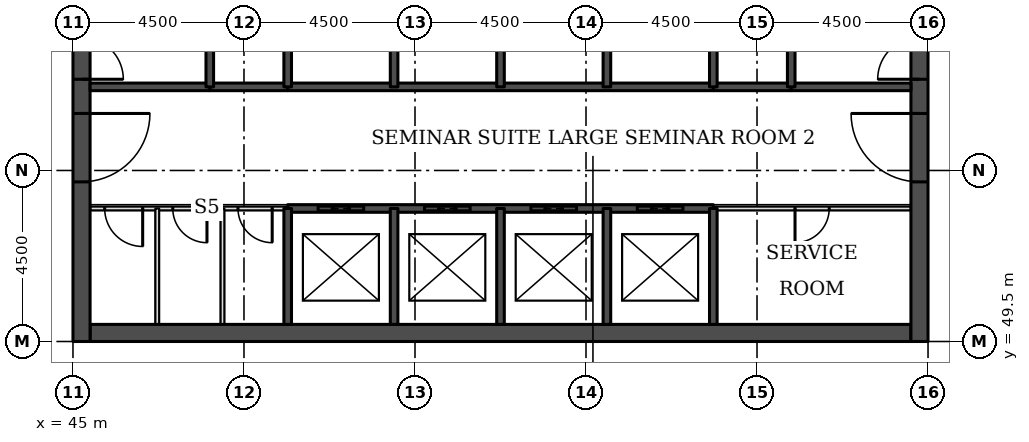
"""IFC4 building model, lengths in metres.
Left out: names, types, materials, properties, quantities, classifications, styles, units other than length and angle.
Written with IfcOpenShell. Run it as: python <this file> out.ifc"""

import sys

from ifc_helpers import new_model, si_unit, direction, frame, frame_2d, origin, place, context, subcontext, project, spatial, rectangle, extrude, element, fill, save


model = new_model("IFC4")
c1 = context("Model", 3, precision=1e-05, world=origin(), true_north=direction((0.0, 1.0)))
c2 = subcontext(c1, "Body", "Model", "MODEL_VIEW")
j1 = project(units=[si_unit("LENGTHUNIT", "METRE"), si_unit("PLANEANGLEUNIT", "RADIAN")], contexts=[c1])
p1 = place(None, origin())
s1 = spatial("IfcSite", under=j1, at=p1, CompositionType="ELEMENT")
p2 = place(p1, origin())
s2 = spatial("IfcBuilding", under=s1, at=p2, CompositionType="ELEMENT")
p3 = place(p2, frame((0.0, 0.0, 101.1)))
s3 = spatial("IfcBuildingStorey", under=s2, at=p3, CompositionType="ELEMENT", Elevation=101.1)
p4 = place(p3, frame((45.45, 49.725, 0.0), z_axis=(0.0, 0.0, 1.0), x_axis=(1.0, 0.0, 0.0)))
e1 = element("IfcWall", 1, at=p4, inside=s3, PredefinedType="SHEAR", context=c2, shape_type="SweptSolid", body=[
    extrude(rectangle(XDim=21.6, YDim=0.45, at=frame_2d((10.8, 0.0))), origin(), (0.0, 0.0, 1.0), 3.7),
])
p5 = place(p3, frame((45.225, 49.5, 0.0), z_axis=(0.0, 0.0, 1.0), x_axis=(0.0, 1.0, 0.0)))
e2 = element("IfcWall", 2, at=p5, inside=s3, PredefinedType="SHEAR", context=c2, shape_type="SweptSolid", body=[
    extrude(rectangle(XDim=22.5, YDim=0.45, at=frame_2d((11.25, 0.0))), origin(), (0.0, 0.0, 1.0), 3.7),
])
p6 = place(p5, frame((4.2, 0.0, 0.0)))
e3 = element("IfcOpeningElement", 3, at=p6, cuts=e2, PredefinedType="OPENING", context=c2, shape_type="SweptSolid", body=[
    extrude(rectangle(XDim=1.8, YDim=2.1, at=frame_2d((0.9, 1.05))), frame((0.0, 0.235, 0.0), z_axis=(0.0, -1.0, 0.0), x_axis=(1.0, 0.0, 0.0)), (0.0, 0.0, 1.0), 0.47),
])
p7 = place(p5, frame((6.9, 0.0, 0.0)))
e4 = element("IfcOpeningElement", 4, at=p7, cuts=e2, PredefinedType="OPENING", context=c2, shape_type="SweptSolid", body=[
    extrude(rectangle(XDim=1.1, YDim=2.1, at=frame_2d((0.55, 1.05))), frame((0.0, 0.235, 0.0), z_axis=(0.0, -1.0, 0.0), x_axis=(1.0, 0.0, 0.0)), (0.0, 0.0, 1.0), 0.47),
])
p8 = place(p5, frame((13.6, 0.0, 0.0)))
e5 = element("IfcOpeningElement", 5, at=p8, cuts=e2, PredefinedType="OPENING", context=c2, shape_type="SweptSolid", body=[
    extrude(rectangle(XDim=1.1, YDim=2.1, at=frame_2d((0.55, 1.05))), frame((0.0, 0.235, 0.0), z_axis=(0.0, -1.0, 0.0), x_axis=(1.0, 0.0, 0.0)), (0.0, 0.0, 1.0), 0.47),
])
p9 = place(p5, frame((16.5, 0.0, 0.0)))
e6 = element("IfcOpeningElement", 6, at=p9, cuts=e2, PredefinedType="OPENING", context=c2, shape_type="SweptSolid", body=[
    extrude(rectangle(XDim=1.8, YDim=2.1, at=frame_2d((0.9, 1.05))), frame((0.0, 0.235, 0.0), z_axis=(0.0, -1.0, 0.0), x_axis=(1.0, 0.0, 0.0)), (0.0, 0.0, 1.0), 0.47),
])
p10 = place(p3, frame((67.275, 49.5, 0.0), z_axis=(0.0, 0.0, 1.0), x_axis=(0.0, 1.0, 0.0)))
e7 = element("IfcWall", 7, at=p10, inside=s3, PredefinedType="SHEAR", context=c2, shape_type="SweptSolid", body=[
    extrude(rectangle(XDim=22.5, YDim=0.45, at=frame_2d((11.25, 0.0))), origin(), (0.0, 0.0, 1.0), 3.7),
])
p11 = place(p10, frame((4.2, 0.0, 0.0)))
e8 = element("IfcOpeningElement", 8, at=p11, cuts=e7, PredefinedType="OPENING", context=c2, shape_type="SweptSolid", body=[
    extrude(rectangle(XDim=1.8, YDim=2.1, at=frame_2d((0.9, 1.05))), frame((0.0, 0.235, 0.0), z_axis=(0.0, -1.0, 0.0), x_axis=(1.0, 0.0, 0.0)), (0.0, 0.0, 1.0), 0.47),
])
p12 = place(p10, frame((6.9, 0.0, 0.0)))
e9 = element("IfcOpeningElement", 9, at=p12, cuts=e7, PredefinedType="OPENING", context=c2, shape_type="SweptSolid", body=[
    extrude(rectangle(XDim=1.1, YDim=2.1, at=frame_2d((0.55, 1.05))), frame((0.0, 0.235, 0.0), z_axis=(0.0, -1.0, 0.0), x_axis=(1.0, 0.0, 0.0)), (0.0, 0.0, 1.0), 0.47),
])
p13 = place(p10, frame((13.6, 0.0, 0.0)))
e10 = element("IfcOpeningElement", 10, at=p13, cuts=e7, PredefinedType="OPENING", context=c2, shape_type="SweptSolid", body=[
    extrude(rectangle(XDim=1.1, YDim=2.1, at=frame_2d((0.55, 1.05))), frame((0.0, 0.235, 0.0), z_axis=(0.0, -1.0, 0.0), x_axis=(1.0, 0.0, 0.0)), (0.0, 0.0, 1.0), 0.47),
])
p14 = place(p10, frame((16.5, 0.0, 0.0)))
e11 = element("IfcOpeningElement", 11, at=p14, cuts=e7, PredefinedType="OPENING", context=c2, shape_type="SweptSolid", body=[
    extrude(rectangle(XDim=1.8, YDim=2.1, at=frame_2d((0.9, 1.05))), frame((0.0, 0.235, 0.0), z_axis=(0.0, -1.0, 0.0), x_axis=(1.0, 0.0, 0.0)), (0.0, 0.0, 1.0), 0.47),
])
p15 = place(p3, frame((45.45, 53.0, 0.0), z_axis=(0.0, 0.0, 1.0), x_axis=(1.0, 0.0, 0.0)))
e12 = element("IfcWall", 12, at=p15, inside=s3, PredefinedType="PARTITIONING", context=c2, shape_type="SweptSolid", body=[
    extrude(rectangle(XDim=5.2, YDim=0.1, at=frame_2d((2.6, 0.0))), origin(), (0.0, 0.0, 1.0), 3.55),
])
p16 = place(p15, frame((0.384, 0.0, 0.0)))
e13 = element("IfcOpeningElement", 13, at=p16, cuts=e12, PredefinedType="OPENING", context=c2, shape_type="SweptSolid", body=[
    extrude(rectangle(XDim=1.0, YDim=2.1, at=frame_2d((0.5, 1.05))), frame((0.0, 0.06, 0.0), z_axis=(0.0, -1.0, 0.0), x_axis=(1.0, 0.0, 0.0)), (0.0, 0.0, 1.0), 0.12),
])
p17 = place(p15, frame((2.176, 0.0, 0.0)))
e14 = element("IfcOpeningElement", 14, at=p17, cuts=e12, PredefinedType="OPENING", context=c2, shape_type="SweptSolid", body=[
    extrude(rectangle(XDim=0.9, YDim=2.1, at=frame_2d((0.45, 1.05))), frame((0.0, 0.06, 0.0), z_axis=(0.0, -1.0, 0.0), x_axis=(1.0, 0.0, 0.0)), (0.0, 0.0, 1.0), 0.12),
])
p18 = place(p15, frame((3.892, 0.0, 0.0)))
e15 = element("IfcOpeningElement", 15, at=p18, cuts=e12, PredefinedType="OPENING", context=c2, shape_type="SweptSolid", body=[
    extrude(rectangle(XDim=0.9, YDim=2.1, at=frame_2d((0.45, 1.05))), frame((0.0, 0.06, 0.0), z_axis=(0.0, -1.0, 0.0), x_axis=(1.0, 0.0, 0.0)), (0.0, 0.0, 1.0), 0.12),
])
p19 = place(p3, frame((61.85, 53.0, 0.0), z_axis=(0.0, 0.0, 1.0), x_axis=(1.0, 0.0, 0.0)))
e16 = element("IfcWall", 16, at=p19, inside=s3, PredefinedType="PARTITIONING", context=c2, shape_type="SweptSolid", body=[
    extrude(rectangle(XDim=5.2, YDim=0.1, at=frame_2d((2.6, 0.0))), origin(), (0.0, 0.0, 1.0), 3.55),
])
p20 = place(p19, frame((2.15, 0.0, 0.0)))
e17 = element("IfcOpeningElement", 17, at=p20, cuts=e16, PredefinedType="OPENING", context=c2, shape_type="SweptSolid", body=[
    extrude(rectangle(XDim=0.9, YDim=2.1, at=frame_2d((0.45, 1.05))), frame((0.0, 0.06, 0.0), z_axis=(0.0, -1.0, 0.0), x_axis=(1.0, 0.0, 0.0)), (0.0, 0.0, 1.0), 0.12),
])
p21 = place(p3, frame((50.65, 53.0, 0.0), z_axis=(0.0, 0.0, 1.0), x_axis=(1.0, 0.0, 0.0)))
e18 = element("IfcWall", 18, at=p21, inside=s3, PredefinedType="SOLIDWALL", context=c2, shape_type="SweptSolid", body=[
    extrude(rectangle(XDim=11.2, YDim=0.2, at=frame_2d((5.6, 0.0))), origin(), (0.0, 0.0, 1.0), 3.55),
])
p22 = place(p21, frame((0.8, 0.0, 0.0)))
e19 = element("IfcOpeningElement", 19, at=p22, cuts=e18, PredefinedType="OPENING", context=c2, shape_type="SweptSolid", body=[
    extrude(rectangle(XDim=1.2, YDim=2.1, at=frame_2d((0.6, 1.05))), frame((0.0, 0.11, 0.0), z_axis=(0.0, -1.0, 0.0), x_axis=(1.0, 0.0, 0.0)), (0.0, 0.0, 1.0), 0.22),
])
p23 = place(p21, frame((3.6, 0.0, 0.0)))
e20 = element("IfcOpeningElement", 20, at=p23, cuts=e18, PredefinedType="OPENING", context=c2, shape_type="SweptSolid", body=[
    extrude(rectangle(XDim=1.2, YDim=2.1, at=frame_2d((0.6, 1.05))), frame((0.0, 0.11, 0.0), z_axis=(0.0, -1.0, 0.0), x_axis=(1.0, 0.0, 0.0)), (0.0, 0.0, 1.0), 0.22),
])
p24 = place(p21, frame((6.4, 0.0, 0.0)))
e21 = element("IfcOpeningElement", 21, at=p24, cuts=e18, PredefinedType="OPENING", context=c2, shape_type="SweptSolid", body=[
    extrude(rectangle(XDim=1.2, YDim=2.1, at=frame_2d((0.6, 1.05))), frame((0.0, 0.11, 0.0), z_axis=(0.0, -1.0, 0.0), x_axis=(1.0, 0.0, 0.0)), (0.0, 0.0, 1.0), 0.22),
])
p25 = place(p21, frame((9.2, 0.0, 0.0)))
e22 = element("IfcOpeningElement", 22, at=p25, cuts=e18, PredefinedType="OPENING", context=c2, shape_type="SweptSolid", body=[
    extrude(rectangle(XDim=1.2, YDim=2.1, at=frame_2d((0.6, 1.05))), frame((0.0, 0.11, 0.0), z_axis=(0.0, -1.0, 0.0), x_axis=(1.0, 0.0, 0.0)), (0.0, 0.0, 1.0), 0.22),
])
for number, where, z_axis, x_axis in (
    (23, (48.6, 56.2, 0.0), (0.0, 0.0, 1.0), (1.0, 0.0, 0.0)),
    (24, (61.85, 56.2, 0.0), (0.0, 0.0, 1.0), (1.0, 0.0, 0.0)),
):
    element("IfcWall", number, at=place(p3, frame(where, z_axis=z_axis, x_axis=x_axis)), inside=s3, PredefinedType="SOLIDWALL", context=c2, shape_type="SweptSolid", body=[
        extrude(rectangle(XDim=2.05, YDim=0.2, at=frame_2d((1.025, 0.0))), origin(), (0.0, 0.0, 1.0), 3.55),
    ])
p26 = place(p3, frame((45.45, 56.2, 0.0), z_axis=(0.0, 0.0, 1.0), x_axis=(1.0, 0.0, 0.0)))
e25 = element("IfcWall", 25, at=p26, inside=s3, PredefinedType="SOLIDWALL", context=c2, shape_type="SweptSolid", body=[
    extrude(rectangle(XDim=3.15, YDim=0.2, at=frame_2d((1.575, 0.0))), origin(), (0.0, 0.0, 1.0), 3.55),
])
p27 = place(p3, frame((50.65, 56.2, 0.0), z_axis=(0.0, 0.0, 1.0), x_axis=(1.0, 0.0, 0.0)))
e26 = element("IfcWall", 26, at=p27, inside=s3, PredefinedType="SOLIDWALL", context=c2, shape_type="SweptSolid", body=[
    extrude(rectangle(XDim=11.2, YDim=0.2, at=frame_2d((5.6, 0.0))), origin(), (0.0, 0.0, 1.0), 3.55),
])
p28 = place(p3, frame((63.9, 56.2, 0.0), z_axis=(0.0, 0.0, 1.0), x_axis=(1.0, 0.0, 0.0)))
e27 = element("IfcWall", 27, at=p28, inside=s3, PredefinedType="SOLIDWALL", context=c2, shape_type="SweptSolid", body=[
    extrude(rectangle(XDim=3.15, YDim=0.2, at=frame_2d((1.575, 0.0))), origin(), (0.0, 0.0, 1.0), 3.55),
])
p29 = place(p3, frame((47.218, 49.95, 0.0), z_axis=(0.0, 0.0, 1.0), x_axis=(0.0, 1.0, 0.0)))
e28 = element("IfcWall", 28, at=p29, inside=s3, PredefinedType="PARTITIONING", context=c2, shape_type="SweptSolid", body=[
    extrude(rectangle(XDim=3.05, YDim=0.1, at=frame_2d((1.525, 0.0))), origin(), (0.0, 0.0, 1.0), 3.55),
])
p30 = place(p3, frame((48.6, 56.2, 0.0), z_axis=(0.0, 0.0, 1.0), x_axis=(0.0, 1.0, 0.0)))
e29 = element("IfcWall", 29, at=p30, inside=s3, PredefinedType="SOLIDWALL", context=c2, shape_type="SweptSolid", body=[
    extrude(rectangle(XDim=5.8, YDim=0.2, at=frame_2d((2.9, 0.0))), origin(), (0.0, 0.0, 1.0), 3.55),
])
p31 = place(p3, frame((48.934, 49.95, 0.0), z_axis=(0.0, 0.0, 1.0), x_axis=(0.0, 1.0, 0.0)))
e30 = element("IfcWall", 30, at=p31, inside=s3, PredefinedType="PARTITIONING", context=c2, shape_type="SweptSolid", body=[
    extrude(rectangle(XDim=3.05, YDim=0.1, at=frame_2d((1.525, 0.0))), origin(), (0.0, 0.0, 1.0), 3.55),
])
p32 = place(p3, frame((50.65, 49.95, 0.0), z_axis=(0.0, 0.0, 1.0), x_axis=(0.0, 1.0, 0.0)))
e31 = element("IfcWall", 31, at=p32, inside=s3, PredefinedType="SOLIDWALL", context=c2, shape_type="SweptSolid", body=[
    extrude(rectangle(XDim=3.05, YDim=0.2, at=frame_2d((1.525, 0.0))), origin(), (0.0, 0.0, 1.0), 3.55),
])
p33 = place(p3, frame((50.65, 56.2, 0.0), z_axis=(0.0, 0.0, 1.0), x_axis=(0.0, 1.0, 0.0)))
e32 = element("IfcWall", 32, at=p33, inside=s3, PredefinedType="SOLIDWALL", context=c2, shape_type="SweptSolid", body=[
    extrude(rectangle(XDim=2.8, YDim=0.2, at=frame_2d((1.4, 0.0))), origin(), (0.0, 0.0, 1.0), 3.55),
])
p34 = place(p3, frame((53.45, 49.95, 0.0), z_axis=(0.0, 0.0, 1.0), x_axis=(0.0, 1.0, 0.0)))
e33 = element("IfcWall", 33, at=p34, inside=s3, PredefinedType="SOLIDWALL", context=c2, shape_type="SweptSolid", body=[
    extrude(rectangle(XDim=3.05, YDim=0.2, at=frame_2d((1.525, 0.0))), origin(), (0.0, 0.0, 1.0), 3.55),
])
p35 = place(p3, frame((53.45, 56.2, 0.0), z_axis=(0.0, 0.0, 1.0), x_axis=(0.0, 1.0, 0.0)))
e34 = element("IfcWall", 34, at=p35, inside=s3, PredefinedType="SOLIDWALL", context=c2, shape_type="SweptSolid", body=[
    extrude(rectangle(XDim=2.8, YDim=0.2, at=frame_2d((1.4, 0.0))), origin(), (0.0, 0.0, 1.0), 3.55),
])
p36 = place(p3, frame((56.25, 49.95, 0.0), z_axis=(0.0, 0.0, 1.0), x_axis=(0.0, 1.0, 0.0)))
e35 = element("IfcWall", 35, at=p36, inside=s3, PredefinedType="SOLIDWALL", context=c2, shape_type="SweptSolid", body=[
    extrude(rectangle(XDim=3.05, YDim=0.2, at=frame_2d((1.525, 0.0))), origin(), (0.0, 0.0, 1.0), 3.55),
])
p37 = place(p3, frame((56.25, 56.2, 0.0), z_axis=(0.0, 0.0, 1.0), x_axis=(0.0, 1.0, 0.0)))
e36 = element("IfcWall", 36, at=p37, inside=s3, PredefinedType="SOLIDWALL", context=c2, shape_type="SweptSolid", body=[
    extrude(rectangle(XDim=2.8, YDim=0.2, at=frame_2d((1.4, 0.0))), origin(), (0.0, 0.0, 1.0), 3.55),
])
p38 = place(p3, frame((59.05, 49.95, 0.0), z_axis=(0.0, 0.0, 1.0), x_axis=(0.0, 1.0, 0.0)))
e37 = element("IfcWall", 37, at=p38, inside=s3, PredefinedType="SOLIDWALL", context=c2, shape_type="SweptSolid", body=[
    extrude(rectangle(XDim=3.05, YDim=0.2, at=frame_2d((1.525, 0.0))), origin(), (0.0, 0.0, 1.0), 3.55),
])
p39 = place(p3, frame((59.05, 56.2, 0.0), z_axis=(0.0, 0.0, 1.0), x_axis=(0.0, 1.0, 0.0)))
e38 = element("IfcWall", 38, at=p39, inside=s3, PredefinedType="SOLIDWALL", context=c2, shape_type="SweptSolid", body=[
    extrude(rectangle(XDim=2.8, YDim=0.2, at=frame_2d((1.4, 0.0))), origin(), (0.0, 0.0, 1.0), 3.55),
])
p40 = place(p3, frame((61.85, 49.95, 0.0), z_axis=(0.0, 0.0, 1.0), x_axis=(0.0, 1.0, 0.0)))
e39 = element("IfcWall", 39, at=p40, inside=s3, PredefinedType="SOLIDWALL", context=c2, shape_type="SweptSolid", body=[
    extrude(rectangle(XDim=3.05, YDim=0.2, at=frame_2d((1.525, 0.0))), origin(), (0.0, 0.0, 1.0), 3.55),
])
p41 = place(p3, frame((61.85, 56.2, 0.0), z_axis=(0.0, 0.0, 1.0), x_axis=(0.0, 1.0, 0.0)))
e40 = element("IfcWall", 40, at=p41, inside=s3, PredefinedType="SOLIDWALL", context=c2, shape_type="SweptSolid", body=[
    extrude(rectangle(XDim=2.8, YDim=0.2, at=frame_2d((1.4, 0.0))), origin(), (0.0, 0.0, 1.0), 3.55),
])
p42 = place(p3, frame((63.9, 56.2, 0.0), z_axis=(0.0, 0.0, 1.0), x_axis=(0.0, 1.0, 0.0)))
e41 = element("IfcWall", 41, at=p42, inside=s3, PredefinedType="SOLIDWALL", context=c2, shape_type="SweptSolid", body=[
    extrude(rectangle(XDim=5.8, YDim=0.2, at=frame_2d((2.9, 0.0))), origin(), (0.0, 0.0, 1.0), 3.55),
])
p43 = place(p22, origin())
e42 = element("IfcDoor", 42, at=p43, inside=s3, OperationType="DOUBLE_DOOR_SLIDING", PredefinedType="DOOR", context=c2, shape_type="SweptSolid", body=[
    extrude(rectangle(XDim=1.2, YDim=2.1, at=frame_2d((0.6, 1.05))), frame((0.0, 0.025, 0.0), z_axis=(0.0, -1.0, 0.0), x_axis=(1.0, 0.0, 0.0)), (0.0, 0.0, 1.0), 0.05),
])
fill(e19, e42)
p44 = place(p23, origin())
e43 = element("IfcDoor", 43, at=p44, inside=s3, OperationType="DOUBLE_DOOR_SLIDING", PredefinedType="DOOR", context=c2, shape_type="SweptSolid", body=[
    extrude(rectangle(XDim=1.2, YDim=2.1, at=frame_2d((0.6, 1.05))), frame((0.0, 0.025, 0.0), z_axis=(0.0, -1.0, 0.0), x_axis=(1.0, 0.0, 0.0)), (0.0, 0.0, 1.0), 0.05),
])
fill(e20, e43)
p45 = place(p24, origin())
e44 = element("IfcDoor", 44, at=p45, inside=s3, OperationType="DOUBLE_DOOR_SLIDING", PredefinedType="DOOR", context=c2, shape_type="SweptSolid", body=[
    extrude(rectangle(XDim=1.2, YDim=2.1, at=frame_2d((0.6, 1.05))), frame((0.0, 0.025, 0.0), z_axis=(0.0, -1.0, 0.0), x_axis=(1.0, 0.0, 0.0)), (0.0, 0.0, 1.0), 0.05),
])
fill(e21, e44)
p46 = place(p25, origin())
e45 = element("IfcDoor", 45, at=p46, inside=s3, OperationType="DOUBLE_DOOR_SLIDING", PredefinedType="DOOR", context=c2, shape_type="SweptSolid", body=[
    extrude(rectangle(XDim=1.2, YDim=2.1, at=frame_2d((0.6, 1.05))), frame((0.0, 0.025, 0.0), z_axis=(0.0, -1.0, 0.0), x_axis=(1.0, 0.0, 0.0)), (0.0, 0.0, 1.0), 0.05),
])
fill(e22, e45)
p47 = place(p6, frame((1.8, 0.0, 0.0), z_axis=(0.0, 0.0, 1.0), x_axis=(-1.0, 0.0, 0.0)))
e46 = element("IfcDoor", 46, at=p47, inside=s3, OperationType="SINGLE_SWING_LEFT", PredefinedType="DOOR", context=c2, shape_type="SweptSolid", body=[
    extrude(rectangle(XDim=1.8, YDim=2.1, at=frame_2d((0.9, 1.05))), frame((0.0, 0.025, 0.0), z_axis=(0.0, -1.0, 0.0), x_axis=(1.0, 0.0, 0.0)), (0.0, 0.0, 1.0), 0.05),
])
fill(e3, e46)
p48 = place(p7, frame((1.1, 0.0, 0.0), z_axis=(0.0, 0.0, 1.0), x_axis=(-1.0, 0.0, 0.0)))
e47 = element("IfcDoor", 47, at=p48, inside=s3, OperationType="SINGLE_SWING_RIGHT", PredefinedType="DOOR", context=c2, shape_type="SweptSolid", body=[
    extrude(rectangle(XDim=1.1, YDim=2.1, at=frame_2d((0.55, 1.05))), frame((0.0, 0.025, 0.0), z_axis=(0.0, -1.0, 0.0), x_axis=(1.0, 0.0, 0.0)), (0.0, 0.0, 1.0), 0.05),
])
fill(e4, e47)
p49 = place(p11, origin())
e48 = element("IfcDoor", 48, at=p49, inside=s3, OperationType="SINGLE_SWING_RIGHT", PredefinedType="DOOR", context=c2, shape_type="SweptSolid", body=[
    extrude(rectangle(XDim=1.8, YDim=2.1, at=frame_2d((0.9, 1.05))), frame((0.0, 0.025, 0.0), z_axis=(0.0, -1.0, 0.0), x_axis=(1.0, 0.0, 0.0)), (0.0, 0.0, 1.0), 0.05),
])
fill(e8, e48)
p50 = place(p12, origin())
e49 = element("IfcDoor", 49, at=p50, inside=s3, OperationType="SINGLE_SWING_LEFT", PredefinedType="DOOR", context=c2, shape_type="SweptSolid", body=[
    extrude(rectangle(XDim=1.1, YDim=2.1, at=frame_2d((0.55, 1.05))), frame((0.0, 0.025, 0.0), z_axis=(0.0, -1.0, 0.0), x_axis=(1.0, 0.0, 0.0)), (0.0, 0.0, 1.0), 0.05),
])
fill(e9, e49)
p51 = place(p20, frame((0.9, 0.0, 0.0), z_axis=(0.0, 0.0, 1.0), x_axis=(-1.0, 0.0, 0.0)))
e50 = element("IfcDoor", 50, at=p51, inside=s3, OperationType="SINGLE_SWING_RIGHT", PredefinedType="DOOR", context=c2, shape_type="SweptSolid", body=[
    extrude(rectangle(XDim=0.9, YDim=2.1, at=frame_2d((0.45, 1.05))), frame((0.0, 0.025, 0.0), z_axis=(0.0, -1.0, 0.0), x_axis=(1.0, 0.0, 0.0)), (0.0, 0.0, 1.0), 0.05),
])
fill(e17, e50)
p52 = place(p16, frame((1.0, 0.0, 0.0), z_axis=(0.0, 0.0, 1.0), x_axis=(-1.0, 0.0, 0.0)))
e51 = element("IfcDoor", 51, at=p52, inside=s3, OperationType="SINGLE_SWING_LEFT", PredefinedType="DOOR", context=c2, shape_type="SweptSolid", body=[
    extrude(rectangle(XDim=1.0, YDim=2.1, at=frame_2d((0.5, 1.05))), frame((0.0, 0.025, 0.0), z_axis=(0.0, -1.0, 0.0), x_axis=(1.0, 0.0, 0.0)), (0.0, 0.0, 1.0), 0.05),
])
fill(e13, e51)
p53 = place(p17, frame((0.9, 0.0, 0.0), z_axis=(0.0, 0.0, 1.0), x_axis=(-1.0, 0.0, 0.0)))
e52 = element("IfcDoor", 52, at=p53, inside=s3, OperationType="SINGLE_SWING_LEFT", PredefinedType="DOOR", context=c2, shape_type="SweptSolid", body=[
    extrude(rectangle(XDim=0.9, YDim=2.1, at=frame_2d((0.45, 1.05))), frame((0.0, 0.025, 0.0), z_axis=(0.0, -1.0, 0.0), x_axis=(1.0, 0.0, 0.0)), (0.0, 0.0, 1.0), 0.05),
])
fill(e14, e52)
p54 = place(p18, frame((0.9, 0.0, 0.0), z_axis=(0.0, 0.0, 1.0), x_axis=(-1.0, 0.0, 0.0)))
e53 = element("IfcDoor", 53, at=p54, inside=s3, OperationType="SINGLE_SWING_LEFT", PredefinedType="DOOR", context=c2, shape_type="SweptSolid", body=[
    extrude(rectangle(XDim=0.9, YDim=2.1, at=frame_2d((0.45, 1.05))), frame((0.0, 0.025, 0.0), z_axis=(0.0, -1.0, 0.0), x_axis=(1.0, 0.0, 0.0)), (0.0, 0.0, 1.0), 0.05),
])
fill(e15, e53)
save(model, sys.argv[1])
